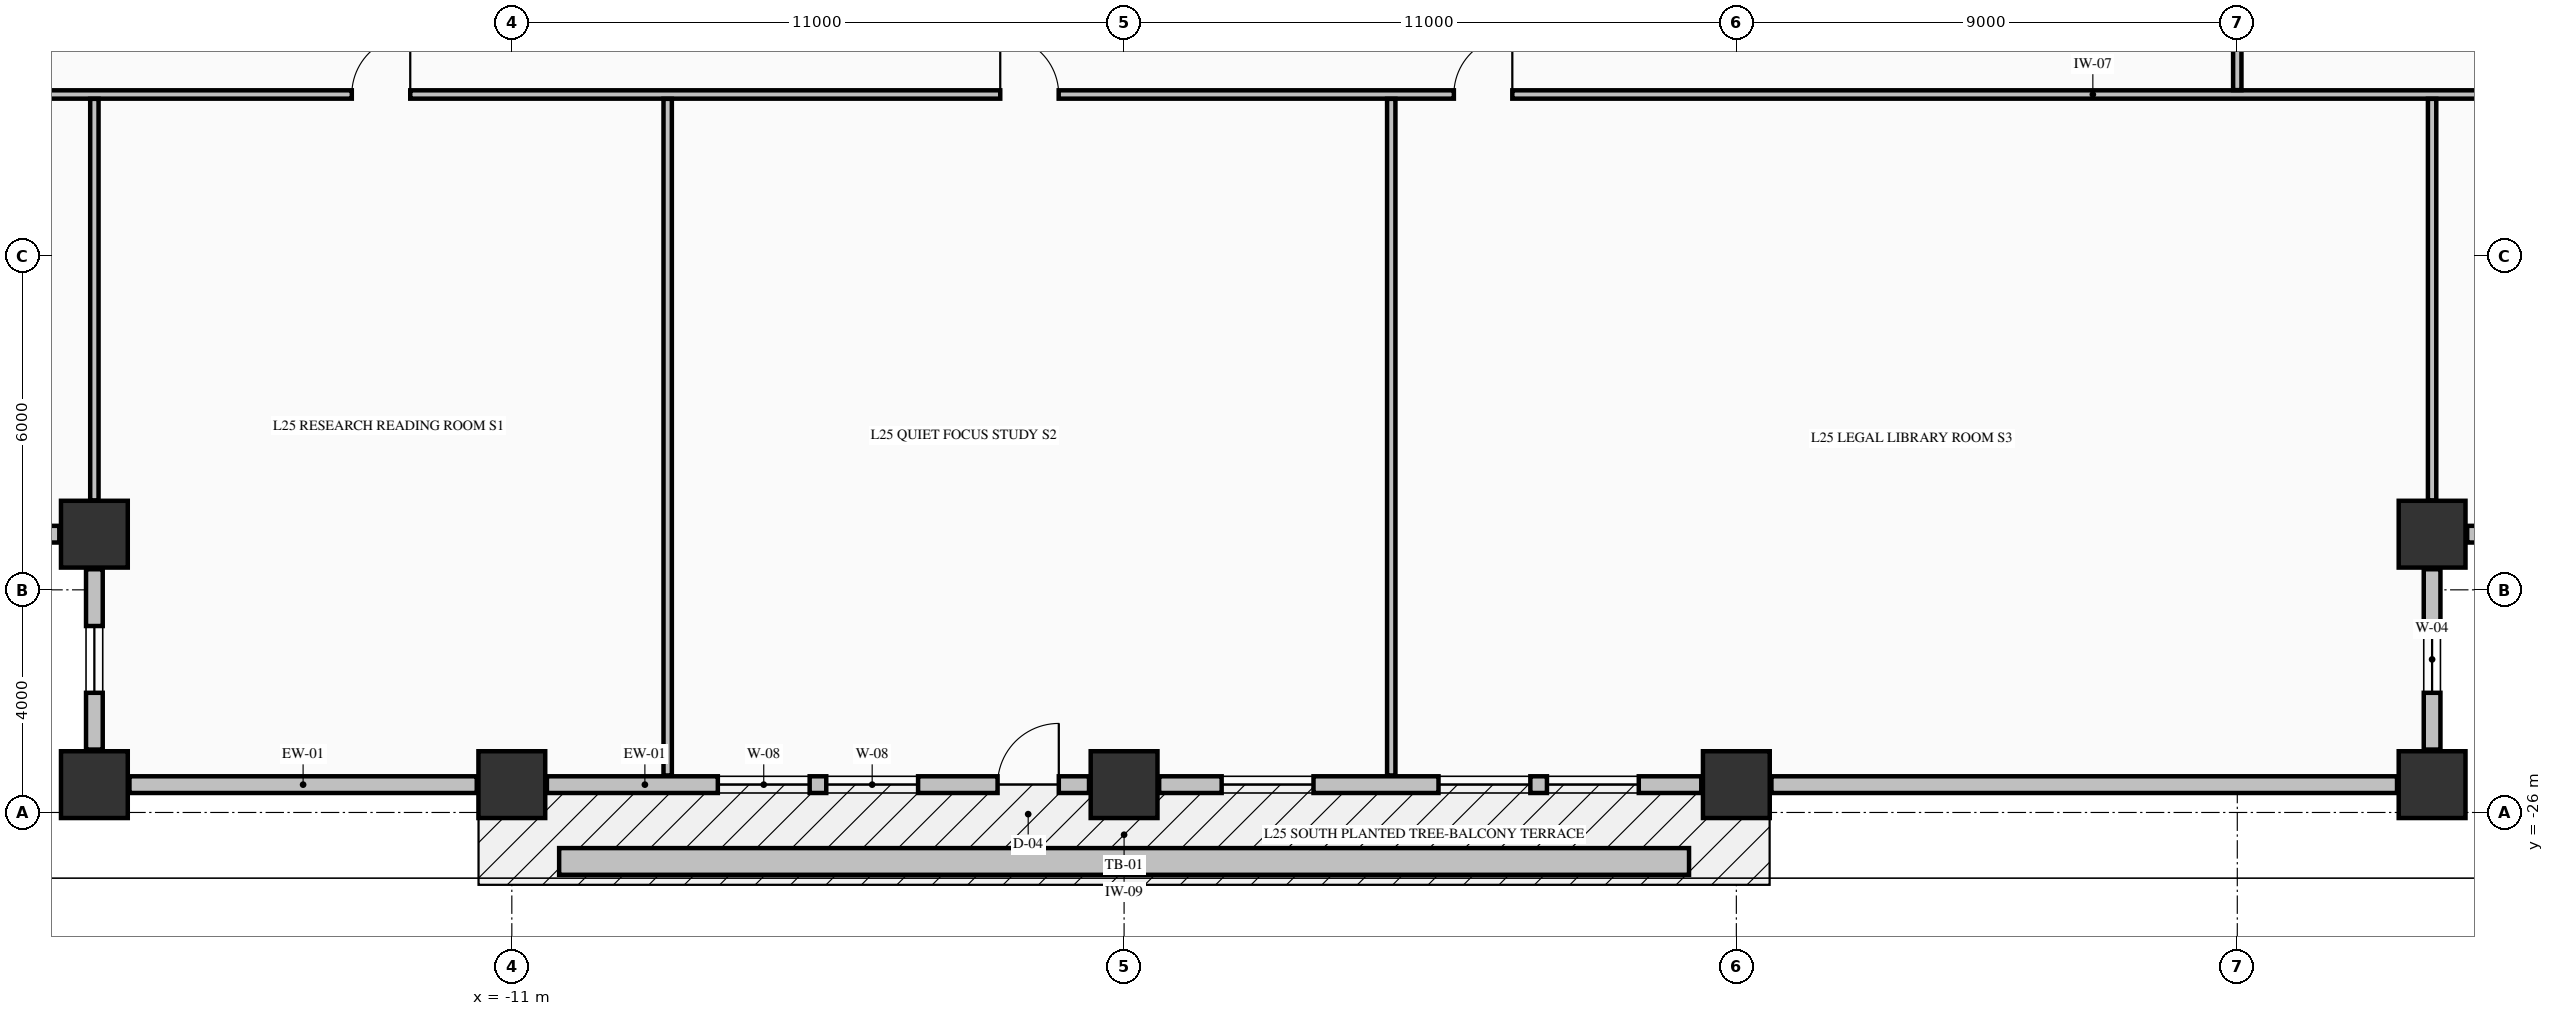
"""IFC4 building model, lengths in metres.
Left out: names, types, materials, properties, quantities, classifications, styles, units other than length and angle.
Written with IfcOpenShell. Run it as: python <this file> out.ifc"""

import sys

from ifc_helpers import new_model, si_unit, direction, frame, frame_2d, origin, origin_2d, place, context, subcontext, project, spatial, rectangle, extrude, element, fill, save


model = new_model("IFC4")
c1 = context("Model", 3, precision=1e-05, world=origin(), true_north=direction((0.0, 1.0)))
c2 = subcontext(c1, "Body", "Model", "MODEL_VIEW")
j1 = project(units=[si_unit("LENGTHUNIT", "METRE"), si_unit("PLANEANGLEUNIT", "RADIAN")], contexts=[c1])
p1 = place(None, origin())
s1 = spatial("IfcSite", under=j1, at=p1, CompositionType="ELEMENT")
p2 = place(p1, origin())
s2 = spatial("IfcBuilding", under=s1, at=p2, CompositionType="ELEMENT")
p3 = place(p2, frame((0.0, 0.0, 102.07)))
s3 = spatial("IfcBuildingStorey", under=s2, at=p3, CompositionType="ELEMENT", Elevation=102.07)
for number, where, z_axis, x_axis in (
    (1, (-18.5, -25.5, -0.25), (0.0, 0.0, 1.0), (1.0, 0.0, 0.0)),
    (2, (-11.0, -25.5, -0.25), (0.0, 0.0, 1.0), (1.0, 0.0, 0.0)),
    (3, (0.0, -25.5, -0.25), (0.0, 0.0, 1.0), (1.0, 0.0, 0.0)),
    (4, (11.0, -25.5, -0.25), (0.0, 0.0, 1.0), (1.0, 0.0, 0.0)),
    (5, (23.5, -25.5, -0.25), (0.0, 0.0, 1.0), (1.0, 0.0, 0.0)),
    (6, (-18.5, -21.0, -0.25), (0.0, 0.0, 1.0), (1.0, 0.0, 0.0)),
    (7, (23.5, -21.0, -0.25), (0.0, 0.0, 1.0), (1.0, 0.0, 0.0)),
):
    element("IfcColumn", number, at=place(p3, frame(where, z_axis=z_axis, x_axis=x_axis)), inside=s3, PredefinedType="COLUMN", context=c2, shape_type="SweptSolid", body=[
        extrude(rectangle(XDim=1.2, YDim=1.2, at=origin_2d()), origin(), (0.0, 0.0, 1.0), 3.57),
    ])
p4 = place(p3, frame((23.5, -24.87, 0.0), z_axis=(0.0, 0.0, 1.0), x_axis=(0.0, 1.0, 0.0)))
e8 = element("IfcWall", 8, at=p4, inside=s3, PredefinedType="STANDARD", context=c2, shape_type="SweptSolid", body=[
    extrude(rectangle(XDim=3.24, YDim=0.3, at=frame_2d((1.62, 0.0))), origin(), (0.0, 0.0, 1.0), 2.712),
])
p5 = place(p4, frame((1.02, 0.0, 0.82)))
e9 = element("IfcOpeningElement", 9, at=p5, cuts=e8, PredefinedType="OPENING", context=c2, shape_type="SweptSolid", body=[
    extrude(rectangle(XDim=1.2, YDim=1.65, at=frame_2d((0.6, 0.825))), frame((0.0, 0.16, 0.0), z_axis=(0.0, -1.0, 0.0), x_axis=(1.0, 0.0, 0.0)), (0.0, 0.0, 1.0), 0.32),
])
p6 = place(p3, frame((24.13, -21.0, 0.0), z_axis=(0.0, 0.0, 1.0), x_axis=(1.0, 0.0, 0.0)))
e10 = element("IfcWall", 10, at=p6, inside=s3, PredefinedType="STANDARD", context=c2, shape_type="SweptSolid", body=[
    extrude(rectangle(XDim=3.24, YDim=0.3, at=frame_2d((1.62, 0.0))), origin(), (0.0, 0.0, 1.0), 2.712),
])
p7 = place(p6, frame((1.02, 0.0, 0.82)))
e11 = element("IfcOpeningElement", 11, at=p7, cuts=e10, PredefinedType="OPENING", context=c2, shape_type="SweptSolid", body=[
    extrude(rectangle(XDim=1.2, YDim=1.65, at=frame_2d((0.6, 0.825))), frame((0.0, 0.16, 0.0), z_axis=(0.0, -1.0, 0.0), x_axis=(1.0, 0.0, 0.0)), (0.0, 0.0, 1.0), 0.32),
])
p8 = place(p3, frame((-22.37, -21.0, 0.0), z_axis=(0.0, 0.0, 1.0), x_axis=(1.0, 0.0, 0.0)))
e12 = element("IfcWall", 12, at=p8, inside=s3, PredefinedType="STANDARD", context=c2, shape_type="SweptSolid", body=[
    extrude(rectangle(XDim=3.24, YDim=0.3, at=frame_2d((1.62, 0.0))), origin(), (0.0, 0.0, 1.0), 2.712),
])
p9 = place(p8, frame((1.02, 0.0, 0.82)))
e13 = element("IfcOpeningElement", 13, at=p9, cuts=e12, PredefinedType="OPENING", context=c2, shape_type="SweptSolid", body=[
    extrude(rectangle(XDim=1.2, YDim=1.65, at=frame_2d((0.6, 0.825))), frame((0.0, 0.16, 0.0), z_axis=(0.0, -1.0, 0.0), x_axis=(1.0, 0.0, 0.0)), (0.0, 0.0, 1.0), 0.32),
])
p10 = place(p3, frame((-18.5, -21.63, 0.0), z_axis=(0.0, 0.0, 1.0), x_axis=(0.0, -1.0, 0.0)))
e14 = element("IfcWall", 14, at=p10, inside=s3, PredefinedType="STANDARD", context=c2, shape_type="SweptSolid", body=[
    extrude(rectangle(XDim=3.24, YDim=0.3, at=frame_2d((1.62, 0.0))), origin(), (0.0, 0.0, 1.0), 2.712),
])
p11 = place(p10, frame((1.02, 0.0, 0.82)))
e15 = element("IfcOpeningElement", 15, at=p11, cuts=e14, PredefinedType="OPENING", context=c2, shape_type="SweptSolid", body=[
    extrude(rectangle(XDim=1.2, YDim=1.65, at=frame_2d((0.6, 0.825))), frame((0.0, 0.16, 0.0), z_axis=(0.0, -1.0, 0.0), x_axis=(1.0, 0.0, 0.0)), (0.0, 0.0, 1.0), 0.32),
])
p12 = place(p3, frame((-17.87, -25.5, 0.0), z_axis=(0.0, 0.0, 1.0), x_axis=(1.0, 0.0, 0.0)))
e16 = element("IfcWall", 16, at=p12, inside=s3, PredefinedType="STANDARD", context=c2, shape_type="SweptSolid", body=[
    extrude(rectangle(XDim=6.24, YDim=0.3, at=frame_2d((3.12, 0.0))), origin(), (0.0, 0.0, 1.0), 2.712),
])
p13 = place(p3, frame((-10.37, -25.5, 0.0), z_axis=(0.0, 0.0, 1.0), x_axis=(1.0, 0.0, 0.0)))
e17 = element("IfcWall", 17, at=p13, inside=s3, PredefinedType="STANDARD", context=c2, shape_type="SweptSolid", body=[
    extrude(rectangle(XDim=9.74, YDim=0.3, at=frame_2d((4.87, 0.0))), origin(), (0.0, 0.0, 1.0), 2.712),
])
p14 = place(p13, frame((8.097, 0.0, 0.0)))
e18 = element("IfcOpeningElement", 18, at=p14, cuts=e17, PredefinedType="OPENING", context=c2, shape_type="SweptSolid", body=[
    extrude(rectangle(XDim=1.1, YDim=2.15, at=frame_2d((0.55, 1.075))), frame((0.0, 0.16, 0.0), z_axis=(0.0, -1.0, 0.0), x_axis=(1.0, 0.0, 0.0)), (0.0, 0.0, 1.0), 0.32),
])
p15 = place(p13, frame((3.071, 0.0, 0.8)))
e19 = element("IfcOpeningElement", 19, at=p15, cuts=e17, PredefinedType="OPENING", context=c2, shape_type="SweptSolid", body=[
    extrude(rectangle(XDim=1.65, YDim=1.7, at=frame_2d((0.825, 0.85))), frame((0.0, 0.16, 0.0), z_axis=(0.0, -1.0, 0.0), x_axis=(1.0, 0.0, 0.0)), (0.0, 0.0, 1.0), 0.32),
])
p16 = place(p13, frame((5.019, 0.0, 0.8)))
e20 = element("IfcOpeningElement", 20, at=p16, cuts=e17, PredefinedType="OPENING", context=c2, shape_type="SweptSolid", body=[
    extrude(rectangle(XDim=1.65, YDim=1.7, at=frame_2d((0.825, 0.85))), frame((0.0, 0.16, 0.0), z_axis=(0.0, -1.0, 0.0), x_axis=(1.0, 0.0, 0.0)), (0.0, 0.0, 1.0), 0.32),
])
p17 = place(p3, frame((0.63, -25.5, 0.0), z_axis=(0.0, 0.0, 1.0), x_axis=(1.0, 0.0, 0.0)))
e21 = element("IfcWall", 21, at=p17, inside=s3, PredefinedType="STANDARD", context=c2, shape_type="SweptSolid", body=[
    extrude(rectangle(XDim=9.74, YDim=0.3, at=frame_2d((4.87, 0.0))), origin(), (0.0, 0.0, 1.0), 2.712),
])
p18 = place(p17, frame((1.123, 0.0, 0.8)))
e22 = element("IfcOpeningElement", 22, at=p18, cuts=e21, PredefinedType="OPENING", context=c2, shape_type="SweptSolid", body=[
    extrude(rectangle(XDim=1.65, YDim=1.7, at=frame_2d((0.825, 0.85))), frame((0.0, 0.16, 0.0), z_axis=(0.0, -1.0, 0.0), x_axis=(1.0, 0.0, 0.0)), (0.0, 0.0, 1.0), 0.32),
])
p19 = place(p17, frame((5.019, 0.0, 0.8)))
e23 = element("IfcOpeningElement", 23, at=p19, cuts=e21, PredefinedType="OPENING", context=c2, shape_type="SweptSolid", body=[
    extrude(rectangle(XDim=1.65, YDim=1.7, at=frame_2d((0.825, 0.85))), frame((0.0, 0.16, 0.0), z_axis=(0.0, -1.0, 0.0), x_axis=(1.0, 0.0, 0.0)), (0.0, 0.0, 1.0), 0.32),
])
p20 = place(p17, frame((6.967, 0.0, 0.8)))
e24 = element("IfcOpeningElement", 24, at=p20, cuts=e21, PredefinedType="OPENING", context=c2, shape_type="SweptSolid", body=[
    extrude(rectangle(XDim=1.65, YDim=1.7, at=frame_2d((0.825, 0.85))), frame((0.0, 0.16, 0.0), z_axis=(0.0, -1.0, 0.0), x_axis=(1.0, 0.0, 0.0)), (0.0, 0.0, 1.0), 0.32),
])
p21 = place(p3, frame((11.63, -25.5, 0.0), z_axis=(0.0, 0.0, 1.0), x_axis=(1.0, 0.0, 0.0)))
e25 = element("IfcWall", 25, at=p21, inside=s3, PredefinedType="STANDARD", context=c2, shape_type="SweptSolid", body=[
    extrude(rectangle(XDim=11.24, YDim=0.3, at=frame_2d((5.62, 0.0))), origin(), (0.0, 0.0, 1.0), 2.712),
])
p22 = place(p3, frame((-22.835, -13.1, 0.0), z_axis=(0.0, 0.0, 1.0), x_axis=(1.0, 0.0, 0.0)))
e26 = element("IfcWall", 26, at=p22, inside=s3, PredefinedType="PARTITIONING", context=c2, shape_type="SweptSolid", body=[
    extrude(rectangle(XDim=50.67, YDim=0.15, at=frame_2d((25.335, 0.0))), origin(), (0.0, 0.0, 1.0), 3.32),
])
p23 = place(p22, frame((8.96, 0.0, 0.0)))
e27 = element("IfcOpeningElement", 27, at=p23, cuts=e26, PredefinedType="OPENING", context=c2, shape_type="SweptSolid", body=[
    extrude(rectangle(XDim=1.05, YDim=2.15, at=frame_2d((0.525, 1.075))), frame((0.0, 0.085, 0.0), z_axis=(0.0, -1.0, 0.0), x_axis=(1.0, 0.0, 0.0)), (0.0, 0.0, 1.0), 0.17),
])
p24 = place(p22, frame((20.61, 0.0, 0.0)))
e28 = element("IfcOpeningElement", 28, at=p24, cuts=e26, PredefinedType="OPENING", context=c2, shape_type="SweptSolid", body=[
    extrude(rectangle(XDim=1.05, YDim=2.15, at=frame_2d((0.525, 1.075))), frame((0.0, 0.085, 0.0), z_axis=(0.0, -1.0, 0.0), x_axis=(1.0, 0.0, 0.0)), (0.0, 0.0, 1.0), 0.17),
])
p25 = place(p22, frame((28.76, 0.0, 0.0)))
e29 = element("IfcOpeningElement", 29, at=p25, cuts=e26, PredefinedType="OPENING", context=c2, shape_type="SweptSolid", body=[
    extrude(rectangle(XDim=1.05, YDim=2.15, at=frame_2d((0.525, 1.075))), frame((0.0, 0.085, 0.0), z_axis=(0.0, -1.0, 0.0), x_axis=(1.0, 0.0, 0.0)), (0.0, 0.0, 1.0), 0.17),
])
p26 = place(p3, frame((-18.5, -20.394, 0.0), z_axis=(0.0, 0.0, 1.0), x_axis=(0.0, 1.0, 0.0)))
e30 = element("IfcWall", 30, at=p26, inside=s3, PredefinedType="PARTITIONING", context=c2, shape_type="SweptSolid", body=[
    extrude(rectangle(XDim=7.216, YDim=0.15, at=frame_2d((3.608, 0.0))), origin(), (0.0, 0.0, 1.0), 3.32),
])
for number, where, z_axis, x_axis in (
    (31, (-8.2, -25.335, 0.0), (0.0, 0.0, 1.0), (0.0, 1.0, 0.0)),
    (32, (4.8, -25.335, 0.0), (0.0, 0.0, 1.0), (0.0, 1.0, 0.0)),
):
    element("IfcWall", number, at=place(p3, frame(where, z_axis=z_axis, x_axis=x_axis)), inside=s3, PredefinedType="PARTITIONING", context=c2, shape_type="SweptSolid", body=[
        extrude(rectangle(XDim=12.157, YDim=0.15, at=frame_2d((6.079, 0.0))), origin(), (0.0, 0.0, 1.0), 3.32),
    ])
p27 = place(p3, frame((20.0, -13.022, 0.0), z_axis=(0.0, 0.0, 1.0), x_axis=(0.0, 1.0, 0.0)))
e33 = element("IfcWall", 33, at=p27, inside=s3, PredefinedType="PARTITIONING", context=c2, shape_type="SweptSolid", body=[
    extrude(rectangle(XDim=2.566, YDim=0.15, at=frame_2d((1.283, 0.0))), origin(), (0.0, 0.0, 1.0), 2.81),
])
p28 = place(p27, frame((1.027, 0.0, 0.0)))
e34 = element("IfcOpeningElement", 34, at=p28, cuts=e33, PredefinedType="OPENING", context=c2, shape_type="SweptSolid", body=[
    extrude(rectangle(XDim=0.95, YDim=2.15, at=frame_2d((0.475, 1.075))), frame((0.0, 0.085, 0.0), z_axis=(0.0, -1.0, 0.0), x_axis=(1.0, 0.0, 0.0)), (0.0, 0.0, 1.0), 0.17),
])
p29 = place(p3, frame((23.5, -20.394, 0.0), z_axis=(0.0, 0.0, 1.0), x_axis=(0.0, 1.0, 0.0)))
e35 = element("IfcWall", 35, at=p29, inside=s3, PredefinedType="PARTITIONING", context=c2, shape_type="SweptSolid", body=[
    extrude(rectangle(XDim=7.216, YDim=0.15, at=frame_2d((3.608, 0.0))), origin(), (0.0, 0.0, 1.0), 3.32),
])
p30 = place(p3, frame((-10.15, -26.88, -0.04), z_axis=(0.0, 0.0, 1.0), x_axis=(1.0, 0.0, 0.0)))
e36 = element("IfcWall", 36, at=p30, inside=s3, PredefinedType="PARAPET", context=c2, shape_type="SweptSolid", body=[
    extrude(rectangle(XDim=20.3, YDim=0.48, at=frame_2d((10.15, 0.0))), origin(), (0.0, 0.0, 1.0), 0.52),
])
p31 = place(p5, origin())
e37 = element("IfcWindow", 37, at=p31, inside=s3, PartitioningType="SINGLE_PANEL", PredefinedType="WINDOW", context=c2, shape_type="SweptSolid", body=[
    extrude(rectangle(XDim=1.2, YDim=1.65, at=frame_2d((0.6, 0.825))), frame((0.0, 0.03, 0.0), z_axis=(0.0, -1.0, 0.0), x_axis=(1.0, 0.0, 0.0)), (0.0, 0.0, 1.0), 0.06),
])
fill(e9, e37)
p32 = place(p11, origin())
e38 = element("IfcWindow", 38, at=p32, inside=s3, PartitioningType="SINGLE_PANEL", PredefinedType="WINDOW", context=c2, shape_type="SweptSolid", body=[
    extrude(rectangle(XDim=1.2, YDim=1.65, at=frame_2d((0.6, 0.825))), frame((0.0, 0.03, 0.0), z_axis=(0.0, -1.0, 0.0), x_axis=(1.0, 0.0, 0.0)), (0.0, 0.0, 1.0), 0.06),
])
fill(e15, e38)
p33 = place(p14, origin())
e39 = element("IfcDoor", 39, at=p33, inside=s3, OperationType="SINGLE_SWING_RIGHT", PredefinedType="DOOR", context=c2, shape_type="SweptSolid", body=[
    extrude(rectangle(XDim=1.1, YDim=2.15, at=frame_2d((0.55, 1.075))), frame((0.0, 0.025, 0.0), z_axis=(0.0, -1.0, 0.0), x_axis=(1.0, 0.0, 0.0)), (0.0, 0.0, 1.0), 0.05),
])
fill(e18, e39)
p34 = place(p15, origin())
e40 = element("IfcWindow", 40, at=p34, inside=s3, PartitioningType="SINGLE_PANEL", PredefinedType="WINDOW", context=c2, shape_type="SweptSolid", body=[
    extrude(rectangle(XDim=1.65, YDim=1.7, at=frame_2d((0.825, 0.85))), frame((0.0, 0.03, 0.0), z_axis=(0.0, -1.0, 0.0), x_axis=(1.0, 0.0, 0.0)), (0.0, 0.0, 1.0), 0.06),
])
fill(e19, e40)
p35 = place(p16, origin())
e41 = element("IfcWindow", 41, at=p35, inside=s3, PartitioningType="SINGLE_PANEL", PredefinedType="WINDOW", context=c2, shape_type="SweptSolid", body=[
    extrude(rectangle(XDim=1.65, YDim=1.7, at=frame_2d((0.825, 0.85))), frame((0.0, 0.03, 0.0), z_axis=(0.0, -1.0, 0.0), x_axis=(1.0, 0.0, 0.0)), (0.0, 0.0, 1.0), 0.06),
])
fill(e20, e41)
p36 = place(p18, origin())
e42 = element("IfcWindow", 42, at=p36, inside=s3, PartitioningType="SINGLE_PANEL", PredefinedType="WINDOW", context=c2, shape_type="SweptSolid", body=[
    extrude(rectangle(XDim=1.65, YDim=1.7, at=frame_2d((0.825, 0.85))), frame((0.0, 0.03, 0.0), z_axis=(0.0, -1.0, 0.0), x_axis=(1.0, 0.0, 0.0)), (0.0, 0.0, 1.0), 0.06),
])
fill(e22, e42)
p37 = place(p19, origin())
e43 = element("IfcWindow", 43, at=p37, inside=s3, PartitioningType="SINGLE_PANEL", PredefinedType="WINDOW", context=c2, shape_type="SweptSolid", body=[
    extrude(rectangle(XDim=1.65, YDim=1.7, at=frame_2d((0.825, 0.85))), frame((0.0, 0.03, 0.0), z_axis=(0.0, -1.0, 0.0), x_axis=(1.0, 0.0, 0.0)), (0.0, 0.0, 1.0), 0.06),
])
fill(e23, e43)
p38 = place(p20, origin())
e44 = element("IfcWindow", 44, at=p38, inside=s3, PartitioningType="SINGLE_PANEL", PredefinedType="WINDOW", context=c2, shape_type="SweptSolid", body=[
    extrude(rectangle(XDim=1.65, YDim=1.7, at=frame_2d((0.825, 0.85))), frame((0.0, 0.03, 0.0), z_axis=(0.0, -1.0, 0.0), x_axis=(1.0, 0.0, 0.0)), (0.0, 0.0, 1.0), 0.06),
])
fill(e24, e44)
p39 = place(p23, origin())
e45 = element("IfcDoor", 45, at=p39, inside=s3, OperationType="SINGLE_SWING_RIGHT", PredefinedType="DOOR", context=c2, shape_type="SweptSolid", body=[
    extrude(rectangle(XDim=1.05, YDim=2.15, at=frame_2d((0.525, 1.075))), frame((0.0, 0.025, 0.0), z_axis=(0.0, -1.0, 0.0), x_axis=(1.0, 0.0, 0.0)), (0.0, 0.0, 1.0), 0.05),
])
fill(e27, e45)
p40 = place(p24, origin())
e46 = element("IfcDoor", 46, at=p40, inside=s3, OperationType="SINGLE_SWING_LEFT", PredefinedType="DOOR", context=c2, shape_type="SweptSolid", body=[
    extrude(rectangle(XDim=1.05, YDim=2.15, at=frame_2d((0.525, 1.075))), frame((0.0, 0.025, 0.0), z_axis=(0.0, -1.0, 0.0), x_axis=(1.0, 0.0, 0.0)), (0.0, 0.0, 1.0), 0.05),
])
fill(e28, e46)
p41 = place(p25, origin())
e47 = element("IfcDoor", 47, at=p41, inside=s3, OperationType="SINGLE_SWING_RIGHT", PredefinedType="DOOR", context=c2, shape_type="SweptSolid", body=[
    extrude(rectangle(XDim=1.05, YDim=2.15, at=frame_2d((0.525, 1.075))), frame((0.0, 0.025, 0.0), z_axis=(0.0, -1.0, 0.0), x_axis=(1.0, 0.0, 0.0)), (0.0, 0.0, 1.0), 0.05),
])
fill(e29, e47)
save(model, sys.argv[1])
